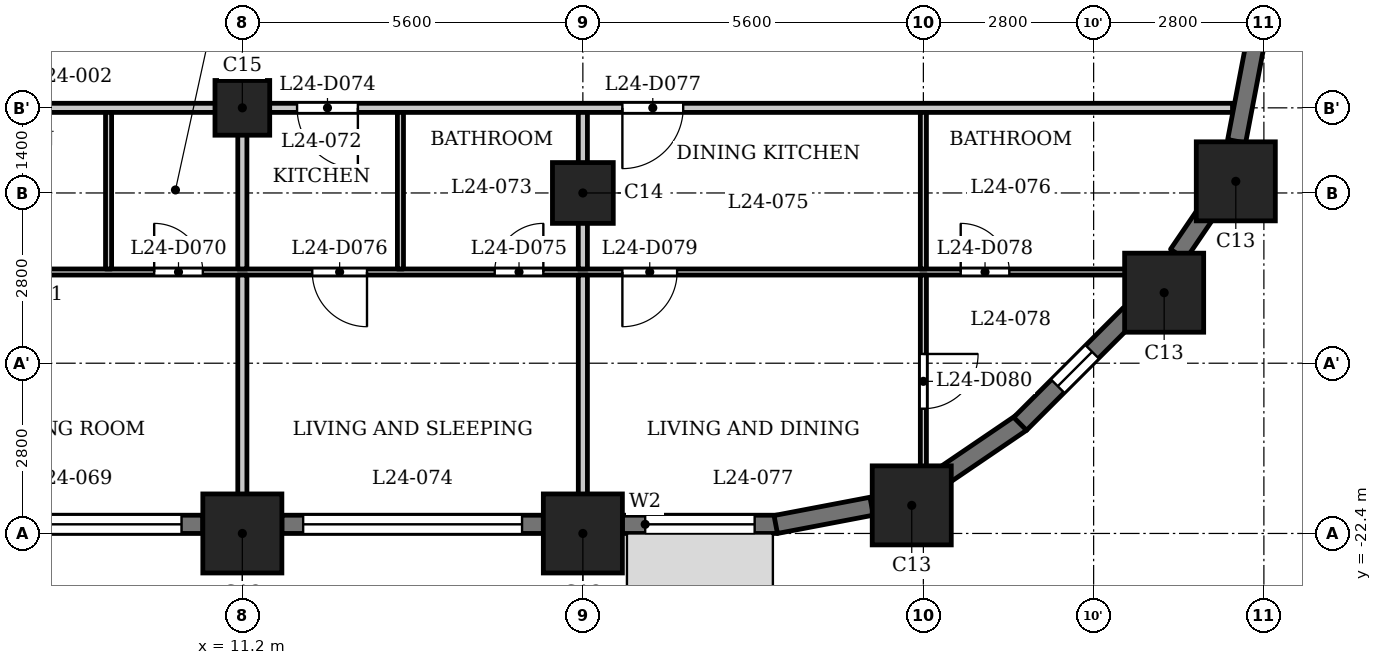
"""IFC4 building model, lengths in metres.
Left out: names, types, materials, properties, quantities, classifications, styles, units other than length and angle.
Written with IfcOpenShell. Run it as: python <this file> out.ifc"""

import sys

from ifc_helpers import new_model, si_unit, direction, frame, frame_2d, origin, origin_2d, place, context, subcontext, project, spatial, rectangle, extrude, element, fill, save


model = new_model("IFC4")
c1 = context("Model", 3, precision=1e-05, world=origin(), true_north=direction((0.0, 1.0)))
c2 = subcontext(c1, "Body", "Model", "MODEL_VIEW")
j1 = project(units=[si_unit("LENGTHUNIT", "METRE"), si_unit("PLANEANGLEUNIT", "RADIAN")], contexts=[c1])
p1 = place(None, origin())
s1 = spatial("IfcSite", under=j1, at=p1, CompositionType="ELEMENT")
p2 = place(p1, origin())
s2 = spatial("IfcBuilding", under=s1, at=p2, CompositionType="ELEMENT")
p3 = place(p2, frame((0.0, 0.0, 97.3)))
s3 = spatial("IfcBuildingStorey", under=s2, at=p3, CompositionType="ELEMENT", Elevation=97.3)
for number, where, z_axis, x_axis in (
    (1, (11.2, -22.4, 0.0), (0.0, 0.0, 1.0), (1.0, 0.0, 0.0)),
    (2, (16.8, -22.4, 0.0), (0.0, 0.0, 1.0), (1.0, 0.0, 0.0)),
    (3, (22.209, -21.938, 0.0), (0.0, 0.0, 1.0), (1.0, 0.0, 0.0)),
    (4, (26.36, -18.44, 0.0), (0.0, 0.0, 1.0), (1.0, 0.0, 0.0)),
    (5, (27.538, -16.609, 0.0), (0.0, 0.0, 1.0), (1.0, 0.0, 0.0)),
):
    element("IfcColumn", number, at=place(p3, frame(where, z_axis=z_axis, x_axis=x_axis)), inside=s3, PredefinedType="COLUMN", context=c2, shape_type="SweptSolid", body=[
        extrude(rectangle(XDim=1.3, YDim=1.3, at=origin_2d()), origin(), (0.0, 0.0, 1.0), 3.5),
    ])
p4 = place(p3, frame((16.8, -16.8, 0.0), z_axis=(0.0, 0.0, 1.0), x_axis=(1.0, 0.0, 0.0)))
e6 = element("IfcColumn", 6, at=p4, inside=s3, PredefinedType="COLUMN", context=c2, shape_type="SweptSolid", body=[
    extrude(rectangle(XDim=1.0, YDim=1.0, at=origin_2d()), origin(), (0.0, 0.0, 1.0), 3.5),
])
p5 = place(p3, frame((11.2, -15.4, 0.0), z_axis=(0.0, 0.0, 1.0), x_axis=(1.0, 0.0, 0.0)))
e7 = element("IfcColumn", 7, at=p5, inside=s3, PredefinedType="COLUMN", context=c2, shape_type="SweptSolid", body=[
    extrude(rectangle(XDim=0.9, YDim=0.9, at=origin_2d()), origin(), (0.0, 0.0, 1.0), 3.5),
])
p6 = place(p3, frame((6.25, -22.25, 0.0), z_axis=(0.0, 0.0, 1.0), x_axis=(1.0, 0.0, 0.0)))
e8 = element("IfcWall", 8, at=p6, inside=s3, PredefinedType="SOLIDWALL", context=c2, shape_type="SweptSolid", body=[
    extrude(rectangle(XDim=4.3, YDim=0.3, at=frame_2d((2.15, 0.0))), origin(), (0.0, 0.0, 1.0), 2.4),
])
p7 = place(p6, frame((0.35, 0.0, 1.2)))
e9 = element("IfcOpeningElement", 9, at=p7, cuts=e8, PredefinedType="OPENING", context=c2, shape_type="SweptSolid", body=[
    extrude(rectangle(XDim=3.6, YDim=0.95, at=frame_2d((1.8, 0.475))), frame((0.0, 0.16, 0.0), z_axis=(0.0, -1.0, 0.0), x_axis=(1.0, 0.0, 0.0)), (0.0, 0.0, 1.0), 0.32),
])
p8 = place(p3, frame((11.85, -22.25, 0.0), z_axis=(0.0, 0.0, 1.0), x_axis=(1.0, 0.0, 0.0)))
e10 = element("IfcWall", 10, at=p8, inside=s3, PredefinedType="SOLIDWALL", context=c2, shape_type="SweptSolid", body=[
    extrude(rectangle(XDim=4.3, YDim=0.3, at=frame_2d((2.15, 0.0))), origin(), (0.0, 0.0, 1.0), 2.4),
])
p9 = place(p8, frame((0.35, 0.0, 1.2)))
e11 = element("IfcOpeningElement", 11, at=p9, cuts=e10, PredefinedType="OPENING", context=c2, shape_type="SweptSolid", body=[
    extrude(rectangle(XDim=3.6, YDim=0.95, at=frame_2d((1.8, 0.475))), frame((0.0, 0.16, 0.0), z_axis=(0.0, -1.0, 0.0), x_axis=(1.0, 0.0, 0.0)), (0.0, 0.0, 1.0), 0.32),
])
p10 = place(p3, frame((17.45, -22.25, 0.0), z_axis=(0.0, 0.0, 1.0), x_axis=(1.0, 0.0, 0.0)))
e12 = element("IfcWall", 12, at=p10, inside=s3, PredefinedType="SOLIDWALL", context=c2, shape_type="SweptSolid", body=[
    extrude(rectangle(XDim=2.55, YDim=0.3, at=frame_2d((1.275, 0.0))), origin(), (0.0, 0.0, 1.0), 2.4),
])
p11 = place(p10, frame((0.375, 0.0, 0.9)))
e13 = element("IfcOpeningElement", 13, at=p11, cuts=e12, PredefinedType="OPENING", context=c2, shape_type="SweptSolid", body=[
    extrude(rectangle(XDim=1.8, YDim=1.25, at=frame_2d((0.9, 0.625))), frame((0.0, 0.16, 0.0), z_axis=(0.0, -1.0, 0.0), x_axis=(1.0, 0.0, 0.0)), (0.0, 0.0, 1.0), 0.32),
])
for number, where, z_axis, x_axis in (
    (14, (19.972, -22.253, 0.0), (0.0, 0.0, 1.0), (0.982, 0.187, 0.0)),
    (15, (22.684, -21.482, 0.0), (0.0, 0.0, 1.0), (0.827, 0.562, 0.0)),
):
    element("IfcWall", number, at=place(p3, frame(where, z_axis=z_axis, x_axis=x_axis)), inside=s3, PredefinedType="SOLIDWALL", context=c2, shape_type="SweptSolid", body=[
        extrude(rectangle(XDim=1.606, YDim=0.3, at=frame_2d((0.803, 0.0))), origin(), (0.0, 0.0, 1.0), 2.4),
    ])
p12 = place(p3, frame((23.991, -20.597, 0.0), z_axis=(0.0, 0.0, 1.0), x_axis=(0.707106781187, 0.707106781187, 0.0)))
e16 = element("IfcWall", 16, at=p12, inside=s3, PredefinedType="SOLIDWALL", context=c2, shape_type="SweptSolid", body=[
    extrude(rectangle(XDim=2.55, YDim=0.3, at=frame_2d((1.275, 0.0))), origin(), (0.0, 0.0, 1.0), 2.4),
])
p13 = place(p12, frame((0.875, 0.0, 0.6)))
e17 = element("IfcOpeningElement", 17, at=p13, cuts=e16, PredefinedType="OPENING", context=c2, shape_type="SweptSolid", body=[
    extrude(rectangle(XDim=0.8, YDim=1.55, at=frame_2d((0.4, 0.775))), frame((0.0, 0.16, 0.0), z_axis=(0.0, -1.0, 0.0), x_axis=(1.0, 0.0, 0.0)), (0.0, 0.0, 1.0), 0.32),
])
p14 = place(p3, frame((26.589, -17.81, 0.0), z_axis=(0.0, 0.0, 1.0), x_axis=(0.562066330934, 0.827092159091, 0.0)))
e18 = element("IfcWall", 18, at=p14, inside=s3, PredefinedType="SOLIDWALL", context=c2, shape_type="SweptSolid", body=[
    extrude(rectangle(XDim=0.877, YDim=0.3, at=frame_2d((0.438, 0.0))), origin(), (0.0, 0.0, 1.0), 3.2),
])
p15 = place(p3, frame((27.552, -15.949, 0.0), z_axis=(0.0, 0.0, 1.0), x_axis=(0.187279751651, 0.982306619453, 0.0)))
e19 = element("IfcWall", 19, at=p15, inside=s3, PredefinedType="SOLIDWALL", context=c2, shape_type="SweptSolid", body=[
    extrude(rectangle(XDim=1.606, YDim=0.3, at=frame_2d((0.803, 0.0))), origin(), (0.0, 0.0, 1.0), 2.4),
])
p16 = place(p3, frame((-26.19, -18.1, 0.0), z_axis=(0.0, 0.0, 1.0), x_axis=(1.0, 0.0, 0.0)))
e20 = element("IfcWall", 20, at=p16, inside=s3, PredefinedType="PARTITIONING", context=c2, shape_type="SweptSolid", body=[
    extrude(rectangle(XDim=52.63, YDim=0.1, at=frame_2d((26.315, 0.0))), origin(), (0.0, 0.0, 1.0), 3.2),
])
p17 = place(p16, frame((1.09, 0.0, 0.0)))
e21 = element("IfcOpeningElement", 21, at=p17, cuts=e20, PredefinedType="OPENING", context=c2, shape_type="SweptSolid", body=[
    extrude(rectangle(XDim=0.8, YDim=2.1, at=frame_2d((0.4, 1.05))), frame((0.0, 0.06, 0.0), z_axis=(0.0, -1.0, 0.0), x_axis=(1.0, 0.0, 0.0)), (0.0, 0.0, 1.0), 0.12),
])
p18 = place(p16, frame((4.44, 0.0, 0.0)))
e22 = element("IfcOpeningElement", 22, at=p18, cuts=e20, PredefinedType="OPENING", context=c2, shape_type="SweptSolid", body=[
    extrude(rectangle(XDim=0.9, YDim=2.1, at=frame_2d((0.45, 1.05))), frame((0.0, 0.06, 0.0), z_axis=(0.0, -1.0, 0.0), x_axis=(1.0, 0.0, 0.0)), (0.0, 0.0, 1.0), 0.12),
])
p19 = place(p16, frame((10.04, 0.0, 0.0)))
e23 = element("IfcOpeningElement", 23, at=p19, cuts=e20, PredefinedType="OPENING", context=c2, shape_type="SweptSolid", body=[
    extrude(rectangle(XDim=0.8, YDim=2.1, at=frame_2d((0.4, 1.05))), frame((0.0, 0.06, 0.0), z_axis=(0.0, -1.0, 0.0), x_axis=(1.0, 0.0, 0.0)), (0.0, 0.0, 1.0), 0.12),
])
p20 = place(p16, frame((15.64, 0.0, 0.0)))
e24 = element("IfcOpeningElement", 24, at=p20, cuts=e20, PredefinedType="OPENING", context=c2, shape_type="SweptSolid", body=[
    extrude(rectangle(XDim=0.9, YDim=2.1, at=frame_2d((0.45, 1.05))), frame((0.0, 0.06, 0.0), z_axis=(0.0, -1.0, 0.0), x_axis=(1.0, 0.0, 0.0)), (0.0, 0.0, 1.0), 0.12),
])
p21 = place(p16, frame((24.74, 0.0, 0.0)))
e25 = element("IfcOpeningElement", 25, at=p21, cuts=e20, PredefinedType="OPENING", context=c2, shape_type="SweptSolid", body=[
    extrude(rectangle(XDim=0.8, YDim=2.1, at=frame_2d((0.4, 1.05))), frame((0.0, 0.06, 0.0), z_axis=(0.0, -1.0, 0.0), x_axis=(1.0, 0.0, 0.0)), (0.0, 0.0, 1.0), 0.12),
])
p22 = place(p16, frame((21.24, 0.0, 0.0)))
e26 = element("IfcOpeningElement", 26, at=p22, cuts=e20, PredefinedType="OPENING", context=c2, shape_type="SweptSolid", body=[
    extrude(rectangle(XDim=0.9, YDim=2.1, at=frame_2d((0.45, 1.05))), frame((0.0, 0.06, 0.0), z_axis=(0.0, -1.0, 0.0), x_axis=(1.0, 0.0, 0.0)), (0.0, 0.0, 1.0), 0.12),
])
p23 = place(p16, frame((35.94, 0.0, 0.0)))
e27 = element("IfcOpeningElement", 27, at=p23, cuts=e20, PredefinedType="OPENING", context=c2, shape_type="SweptSolid", body=[
    extrude(rectangle(XDim=0.8, YDim=2.1, at=frame_2d((0.4, 1.05))), frame((0.0, 0.06, 0.0), z_axis=(0.0, -1.0, 0.0), x_axis=(1.0, 0.0, 0.0)), (0.0, 0.0, 1.0), 0.12),
])
p24 = place(p16, frame((33.19, 0.0, 0.0)))
e28 = element("IfcOpeningElement", 28, at=p24, cuts=e20, PredefinedType="OPENING", context=c2, shape_type="SweptSolid", body=[
    extrude(rectangle(XDim=0.9, YDim=2.1, at=frame_2d((0.45, 1.05))), frame((0.0, 0.06, 0.0), z_axis=(0.0, -1.0, 0.0), x_axis=(1.0, 0.0, 0.0)), (0.0, 0.0, 1.0), 0.12),
])
p25 = place(p16, frame((27.59, 0.0, 0.0)))
e29 = element("IfcOpeningElement", 29, at=p25, cuts=e20, PredefinedType="OPENING", context=c2, shape_type="SweptSolid", body=[
    extrude(rectangle(XDim=0.9, YDim=2.1, at=frame_2d((0.45, 1.05))), frame((0.0, 0.06, 0.0), z_axis=(0.0, -1.0, 0.0), x_axis=(1.0, 0.0, 0.0)), (0.0, 0.0, 1.0), 0.12),
])
p26 = place(p16, frame((29.64, 0.0, 0.0)))
e30 = element("IfcOpeningElement", 30, at=p26, cuts=e20, PredefinedType="OPENING", context=c2, shape_type="SweptSolid", body=[
    extrude(rectangle(XDim=0.9, YDim=2.1, at=frame_2d((0.45, 1.05))), frame((0.0, 0.06, 0.0), z_axis=(0.0, -1.0, 0.0), x_axis=(1.0, 0.0, 0.0)), (0.0, 0.0, 1.0), 0.12),
])
p27 = place(p16, frame((41.54, 0.0, 0.0)))
e31 = element("IfcOpeningElement", 31, at=p27, cuts=e20, PredefinedType="OPENING", context=c2, shape_type="SweptSolid", body=[
    extrude(rectangle(XDim=0.8, YDim=2.1, at=frame_2d((0.4, 1.05))), frame((0.0, 0.06, 0.0), z_axis=(0.0, -1.0, 0.0), x_axis=(1.0, 0.0, 0.0)), (0.0, 0.0, 1.0), 0.12),
])
p28 = place(p16, frame((38.54, 0.0, 0.0)))
e32 = element("IfcOpeningElement", 32, at=p28, cuts=e20, PredefinedType="OPENING", context=c2, shape_type="SweptSolid", body=[
    extrude(rectangle(XDim=0.9, YDim=2.1, at=frame_2d((0.45, 1.05))), frame((0.0, 0.06, 0.0), z_axis=(0.0, -1.0, 0.0), x_axis=(1.0, 0.0, 0.0)), (0.0, 0.0, 1.0), 0.12),
])
p29 = place(p16, frame((49.204, 0.0, 0.0)))
e33 = element("IfcOpeningElement", 33, at=p29, cuts=e20, PredefinedType="OPENING", context=c2, shape_type="SweptSolid", body=[
    extrude(rectangle(XDim=0.8, YDim=2.1, at=frame_2d((0.4, 1.05))), frame((0.0, 0.06, 0.0), z_axis=(0.0, -1.0, 0.0), x_axis=(1.0, 0.0, 0.0)), (0.0, 0.0, 1.0), 0.12),
])
p30 = place(p16, frame((43.64, 0.0, 0.0)))
e34 = element("IfcOpeningElement", 34, at=p30, cuts=e20, PredefinedType="OPENING", context=c2, shape_type="SweptSolid", body=[
    extrude(rectangle(XDim=0.9, YDim=2.1, at=frame_2d((0.45, 1.05))), frame((0.0, 0.06, 0.0), z_axis=(0.0, -1.0, 0.0), x_axis=(1.0, 0.0, 0.0)), (0.0, 0.0, 1.0), 0.12),
])
p31 = place(p3, frame((-27.484, -15.4, 0.0), z_axis=(0.0, 0.0, 1.0), x_axis=(1.0, 0.0, 0.0)))
e35 = element("IfcWall", 35, at=p31, inside=s3, PredefinedType="PARTITIONING", context=c2, shape_type="SweptSolid", body=[
    extrude(rectangle(XDim=54.968, YDim=0.15, at=frame_2d((27.484, 0.0))), origin(), (0.0, 0.0, 1.0), 3.2),
])
p32 = place(p31, frame((5.734, 0.0, 0.0)))
e36 = element("IfcOpeningElement", 36, at=p32, cuts=e35, PredefinedType="OPENING", context=c2, shape_type="SweptSolid", body=[
    extrude(rectangle(XDim=1.0, YDim=2.1, at=frame_2d((0.5, 1.05))), frame((0.0, 0.085, 0.0), z_axis=(0.0, -1.0, 0.0), x_axis=(1.0, 0.0, 0.0)), (0.0, 0.0, 1.0), 0.17),
])
p33 = place(p31, frame((16.934, 0.0, 0.0)))
e37 = element("IfcOpeningElement", 37, at=p33, cuts=e35, PredefinedType="OPENING", context=c2, shape_type="SweptSolid", body=[
    extrude(rectangle(XDim=1.0, YDim=2.1, at=frame_2d((0.5, 1.05))), frame((0.0, 0.085, 0.0), z_axis=(0.0, -1.0, 0.0), x_axis=(1.0, 0.0, 0.0)), (0.0, 0.0, 1.0), 0.17),
])
p34 = place(p31, frame((22.534, 0.0, 0.0)))
e38 = element("IfcOpeningElement", 38, at=p34, cuts=e35, PredefinedType="OPENING", context=c2, shape_type="SweptSolid", body=[
    extrude(rectangle(XDim=1.0, YDim=2.1, at=frame_2d((0.5, 1.05))), frame((0.0, 0.085, 0.0), z_axis=(0.0, -1.0, 0.0), x_axis=(1.0, 0.0, 0.0)), (0.0, 0.0, 1.0), 0.17),
])
p35 = place(p31, frame((31.384, 0.0, 0.0)))
e39 = element("IfcOpeningElement", 39, at=p35, cuts=e35, PredefinedType="OPENING", context=c2, shape_type="SweptSolid", body=[
    extrude(rectangle(XDim=1.0, YDim=2.1, at=frame_2d((0.5, 1.05))), frame((0.0, 0.085, 0.0), z_axis=(0.0, -1.0, 0.0), x_axis=(1.0, 0.0, 0.0)), (0.0, 0.0, 1.0), 0.17),
])
p36 = place(p31, frame((39.584, 0.0, 0.0)))
e40 = element("IfcOpeningElement", 40, at=p36, cuts=e35, PredefinedType="OPENING", context=c2, shape_type="SweptSolid", body=[
    extrude(rectangle(XDim=1.0, YDim=2.1, at=frame_2d((0.5, 1.05))), frame((0.0, 0.085, 0.0), z_axis=(0.0, -1.0, 0.0), x_axis=(1.0, 0.0, 0.0)), (0.0, 0.0, 1.0), 0.17),
])
p37 = place(p31, frame((44.934, 0.0, 0.0)))
e41 = element("IfcOpeningElement", 41, at=p37, cuts=e35, PredefinedType="OPENING", context=c2, shape_type="SweptSolid", body=[
    extrude(rectangle(XDim=1.0, YDim=2.1, at=frame_2d((0.5, 1.05))), frame((0.0, 0.085, 0.0), z_axis=(0.0, -1.0, 0.0), x_axis=(1.0, 0.0, 0.0)), (0.0, 0.0, 1.0), 0.17),
])
p38 = place(p3, frame((9.0, -18.05, 0.0), z_axis=(0.0, 0.0, 1.0), x_axis=(0.0, 1.0, 0.0)))
e42 = element("IfcWall", 42, at=p38, inside=s3, PredefinedType="PARTITIONING", context=c2, shape_type="SweptSolid", body=[
    extrude(rectangle(XDim=2.575, YDim=0.1, at=frame_2d((1.288, 0.0))), origin(), (0.0, 0.0, 1.0), 3.2),
])
p39 = place(p3, frame((11.2, -23.03, 0.0), z_axis=(0.0, 0.0, 1.0), x_axis=(0.0, 1.0, 0.0)))
e43 = element("IfcWall", 43, at=p39, inside=s3, PredefinedType="PARTITIONING", context=c2, shape_type="SweptSolid", body=[
    extrude(rectangle(XDim=4.88, YDim=0.15, at=frame_2d((2.44, 0.0))), origin(), (0.0, 0.0, 1.0), 3.2),
])
p40 = place(p3, frame((11.2, -18.05, 0.0), z_axis=(0.0, 0.0, 1.0), x_axis=(0.0, 1.0, 0.0)))
e44 = element("IfcWall", 44, at=p40, inside=s3, PredefinedType="PARTITIONING", context=c2, shape_type="SweptSolid", body=[
    extrude(rectangle(XDim=2.575, YDim=0.15, at=frame_2d((1.288, 0.0))), origin(), (0.0, 0.0, 1.0), 3.2),
])
p41 = place(p3, frame((13.8, -18.05, 0.0), z_axis=(0.0, 0.0, 1.0), x_axis=(0.0, 1.0, 0.0)))
e45 = element("IfcWall", 45, at=p41, inside=s3, PredefinedType="PARTITIONING", context=c2, shape_type="SweptSolid", body=[
    extrude(rectangle(XDim=2.575, YDim=0.1, at=frame_2d((1.288, 0.0))), origin(), (0.0, 0.0, 1.0), 3.2),
])
p42 = place(p3, frame((16.8, -23.03, 0.0), z_axis=(0.0, 0.0, 1.0), x_axis=(0.0, 1.0, 0.0)))
e46 = element("IfcWall", 46, at=p42, inside=s3, PredefinedType="PARTITIONING", context=c2, shape_type="SweptSolid", body=[
    extrude(rectangle(XDim=4.88, YDim=0.15, at=frame_2d((2.44, 0.0))), origin(), (0.0, 0.0, 1.0), 3.2),
])
p43 = place(p3, frame((16.8, -18.05, 0.0), z_axis=(0.0, 0.0, 1.0), x_axis=(0.0, 1.0, 0.0)))
e47 = element("IfcWall", 47, at=p43, inside=s3, PredefinedType="PARTITIONING", context=c2, shape_type="SweptSolid", body=[
    extrude(rectangle(XDim=2.575, YDim=0.15, at=frame_2d((1.288, 0.0))), origin(), (0.0, 0.0, 1.0), 3.2),
])
p44 = place(p3, frame((22.4, -21.72, 0.0), z_axis=(0.0, 0.0, 1.0), x_axis=(0.0, 1.0, 0.0)))
e48 = element("IfcWall", 48, at=p44, inside=s3, PredefinedType="PARTITIONING", context=c2, shape_type="SweptSolid", body=[
    extrude(rectangle(XDim=3.57, YDim=0.1, at=frame_2d((1.785, 0.0))), origin(), (0.0, 0.0, 1.0), 3.2),
])
p45 = place(p44, frame((1.372, 0.0, 0.0)))
e49 = element("IfcOpeningElement", 49, at=p45, cuts=e48, PredefinedType="OPENING", context=c2, shape_type="SweptSolid", body=[
    extrude(rectangle(XDim=0.9, YDim=2.1, at=frame_2d((0.45, 1.05))), frame((0.0, 0.06, 0.0), z_axis=(0.0, -1.0, 0.0), x_axis=(1.0, 0.0, 0.0)), (0.0, 0.0, 1.0), 0.12),
])
p46 = place(p3, frame((22.4, -18.05, 0.0), z_axis=(0.0, 0.0, 1.0), x_axis=(0.0, 1.0, 0.0)))
e50 = element("IfcWall", 50, at=p46, inside=s3, PredefinedType="PARTITIONING", context=c2, shape_type="SweptSolid", body=[
    extrude(rectangle(XDim=2.575, YDim=0.1, at=frame_2d((1.288, 0.0))), origin(), (0.0, 0.0, 1.0), 3.2),
])
p47 = place(p23, origin())
e51 = element("IfcDoor", 51, at=p47, inside=s3, OperationType="SINGLE_SWING_RIGHT", PredefinedType="DOOR", context=c2, shape_type="SweptSolid", body=[
    extrude(rectangle(XDim=0.8, YDim=2.1, at=frame_2d((0.4, 1.05))), frame((0.0, 0.025, 0.0), z_axis=(0.0, -1.0, 0.0), x_axis=(1.0, 0.0, 0.0)), (0.0, 0.0, 1.0), 0.05),
])
fill(e27, e51)
p48 = place(p36, origin())
e52 = element("IfcDoor", 52, at=p48, inside=s3, OperationType="SINGLE_SWING_RIGHT", PredefinedType="DOOR", context=c2, shape_type="SweptSolid", body=[
    extrude(rectangle(XDim=1.0, YDim=2.1, at=frame_2d((0.5, 1.05))), frame((0.0, 0.025, 0.0), z_axis=(0.0, -1.0, 0.0), x_axis=(1.0, 0.0, 0.0)), (0.0, 0.0, 1.0), 0.05),
])
fill(e40, e52)
p49 = place(p27, origin())
e53 = element("IfcDoor", 53, at=p49, inside=s3, OperationType="SINGLE_SWING_LEFT", PredefinedType="DOOR", context=c2, shape_type="SweptSolid", body=[
    extrude(rectangle(XDim=0.8, YDim=2.1, at=frame_2d((0.4, 1.05))), frame((0.0, 0.025, 0.0), z_axis=(0.0, -1.0, 0.0), x_axis=(1.0, 0.0, 0.0)), (0.0, 0.0, 1.0), 0.05),
])
fill(e31, e53)
p50 = place(p28, origin())
e54 = element("IfcDoor", 54, at=p50, inside=s3, OperationType="SINGLE_SWING_RIGHT", PredefinedType="DOOR", context=c2, shape_type="SweptSolid", body=[
    extrude(rectangle(XDim=0.9, YDim=2.1, at=frame_2d((0.45, 1.05))), frame((0.0, 0.025, 0.0), z_axis=(0.0, -1.0, 0.0), x_axis=(1.0, 0.0, 0.0)), (0.0, 0.0, 1.0), 0.05),
])
fill(e32, e54)
p51 = place(p37, origin())
e55 = element("IfcDoor", 55, at=p51, inside=s3, OperationType="SINGLE_SWING_LEFT", PredefinedType="DOOR", context=c2, shape_type="SweptSolid", body=[
    extrude(rectangle(XDim=1.0, YDim=2.1, at=frame_2d((0.5, 1.05))), frame((0.0, 0.025, 0.0), z_axis=(0.0, -1.0, 0.0), x_axis=(1.0, 0.0, 0.0)), (0.0, 0.0, 1.0), 0.05),
])
fill(e41, e55)
p52 = place(p29, origin())
e56 = element("IfcDoor", 56, at=p52, inside=s3, OperationType="SINGLE_SWING_RIGHT", PredefinedType="DOOR", context=c2, shape_type="SweptSolid", body=[
    extrude(rectangle(XDim=0.8, YDim=2.1, at=frame_2d((0.4, 1.05))), frame((0.0, 0.025, 0.0), z_axis=(0.0, -1.0, 0.0), x_axis=(1.0, 0.0, 0.0)), (0.0, 0.0, 1.0), 0.05),
])
fill(e33, e56)
p53 = place(p30, origin())
e57 = element("IfcDoor", 57, at=p53, inside=s3, OperationType="SINGLE_SWING_LEFT", PredefinedType="DOOR", context=c2, shape_type="SweptSolid", body=[
    extrude(rectangle(XDim=0.9, YDim=2.1, at=frame_2d((0.45, 1.05))), frame((0.0, 0.025, 0.0), z_axis=(0.0, -1.0, 0.0), x_axis=(1.0, 0.0, 0.0)), (0.0, 0.0, 1.0), 0.05),
])
fill(e34, e57)
p54 = place(p45, origin())
e58 = element("IfcDoor", 58, at=p54, inside=s3, OperationType="SINGLE_SWING_RIGHT", PredefinedType="DOOR", context=c2, shape_type="SweptSolid", body=[
    extrude(rectangle(XDim=0.9, YDim=2.1, at=frame_2d((0.45, 1.05))), frame((0.0, 0.025, 0.0), z_axis=(0.0, -1.0, 0.0), x_axis=(1.0, 0.0, 0.0)), (0.0, 0.0, 1.0), 0.05),
])
fill(e49, e58)
p55 = place(p7, origin())
e59 = element("IfcWindow", 59, at=p55, inside=s3, PartitioningType="SINGLE_PANEL", PredefinedType="WINDOW", context=c2, shape_type="SweptSolid", body=[
    extrude(rectangle(XDim=3.6, YDim=0.95, at=frame_2d((1.8, 0.475))), frame((0.0, 0.03, 0.0), z_axis=(0.0, -1.0, 0.0), x_axis=(1.0, 0.0, 0.0)), (0.0, 0.0, 1.0), 0.06),
])
fill(e9, e59)
p56 = place(p9, origin())
e60 = element("IfcWindow", 60, at=p56, inside=s3, PartitioningType="SINGLE_PANEL", PredefinedType="WINDOW", context=c2, shape_type="SweptSolid", body=[
    extrude(rectangle(XDim=3.6, YDim=0.95, at=frame_2d((1.8, 0.475))), frame((0.0, 0.03, 0.0), z_axis=(0.0, -1.0, 0.0), x_axis=(1.0, 0.0, 0.0)), (0.0, 0.0, 1.0), 0.06),
])
fill(e11, e60)
p57 = place(p11, origin())
e61 = element("IfcWindow", 61, at=p57, inside=s3, PartitioningType="SINGLE_PANEL", PredefinedType="WINDOW", context=c2, shape_type="SweptSolid", body=[
    extrude(rectangle(XDim=1.8, YDim=1.25, at=frame_2d((0.9, 0.625))), frame((0.0, 0.03, 0.0), z_axis=(0.0, -1.0, 0.0), x_axis=(1.0, 0.0, 0.0)), (0.0, 0.0, 1.0), 0.06),
])
fill(e13, e61)
p58 = place(p13, origin())
e62 = element("IfcWindow", 62, at=p58, inside=s3, PartitioningType="SINGLE_PANEL", PredefinedType="WINDOW", context=c2, shape_type="SweptSolid", body=[
    extrude(rectangle(XDim=0.8, YDim=1.55, at=frame_2d((0.4, 0.775))), frame((0.0, 0.03, 0.0), z_axis=(0.0, -1.0, 0.0), x_axis=(1.0, 0.0, 0.0)), (0.0, 0.0, 1.0), 0.06),
])
fill(e17, e62)
save(model, sys.argv[1])
